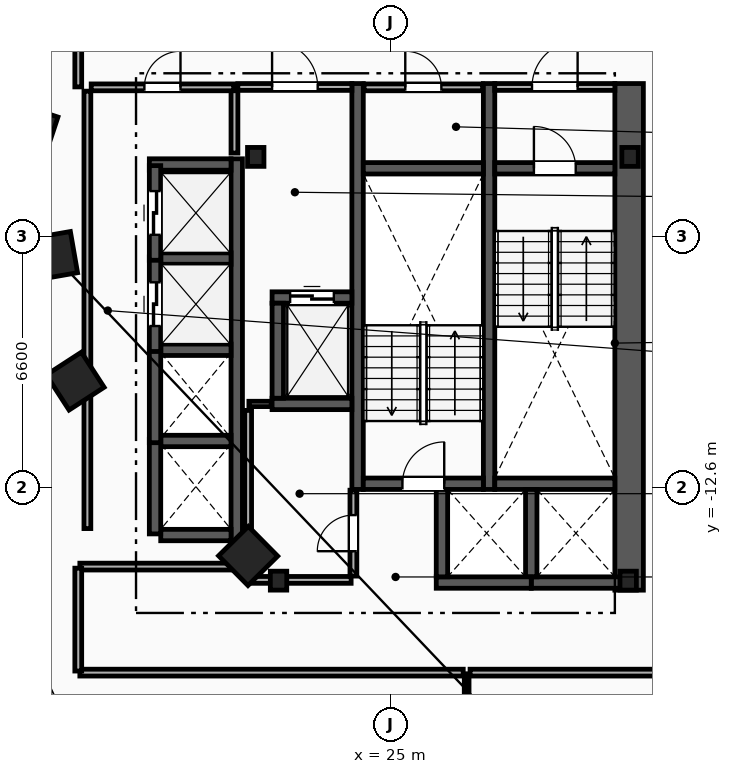
"""IFC4 building model, lengths in metres.
Left out: names, types, materials, properties, quantities, classifications, styles, units other than length and angle.
Written with IfcOpenShell. Run it as: python <this file> out.ifc"""

import sys

from ifc_helpers import new_model, si_unit, direction, frame, frame_2d, origin, origin_2d, place, context, subcontext, project, spatial, rectangle, i_section, extrude, element, fill, save


model = new_model("IFC4")
c1 = context("Model", 3, precision=1e-05, world=origin(), true_north=direction((0.0, 1.0)))
c2 = subcontext(c1, "Body", "Model", "MODEL_VIEW")
j1 = project(units=[si_unit("LENGTHUNIT", "METRE"), si_unit("PLANEANGLEUNIT", "RADIAN")], contexts=[c1])
p1 = place(None, origin())
s1 = spatial("IfcSite", under=j1, at=p1, CompositionType="ELEMENT")
p2 = place(p1, origin())
s2 = spatial("IfcBuilding", under=s1, at=p2, CompositionType="ELEMENT")
p3 = place(p2, frame((0.0, 0.0, 103.4)))
s3 = spatial("IfcBuildingStorey", under=s2, at=p3, CompositionType="ELEMENT", Elevation=103.4)
for number, where, z_axis, x_axis in (
    (1, (31.3, -3.9, 0.0), (0.0, 0.0, 1.0), (1.0, 0.0, 0.0)),
    (2, (21.45, -3.9, 0.0), (0.0, 0.0, 1.0), (1.0, 0.0, 0.0)),
    (3, (22.05, -15.05, 0.0), (0.0, 0.0, 1.0), (1.0, 0.0, 0.0)),
    (4, (31.25, -15.05, 0.0), (0.0, 0.0, 1.0), (1.0, 0.0, 0.0)),
):
    element("IfcColumn", number, at=place(p3, frame(where, z_axis=z_axis, x_axis=x_axis)), inside=s3, PredefinedType="COLUMN", context=c2, shape_type="SweptSolid", body=[
        extrude(i_section(OverallWidth=0.432, OverallDepth=0.498, WebThickness=0.056, FlangeThickness=0.089, FilletRadius=0.018, at=origin_2d()), origin(), (0.0, 0.0, 1.0), 3.6),
    ])
for number, where, z_axis, x_axis in (
    (5, (15.55, -3.2, 0.0), (0.0, 0.0, 1.0), (-0.315, -0.949, 0.0)),
    (6, (16.125, -6.5, 0.0), (0.0, 0.0, 1.0), (0.172, -0.985, 0.0)),
    (7, (16.7, -9.8, 0.0), (0.0, 0.0, 1.0), (0.544, -0.839, 0.0)),
    (8, (21.25, -14.4, 0.0), (0.0, 0.0, 1.0), (0.703, -0.711, 0.0)),
):
    element("IfcColumn", number, at=place(p3, frame(where, z_axis=z_axis, x_axis=x_axis)), inside=s3, PredefinedType="COLUMN", context=c2, shape_type="SweptSolid", body=[
        extrude(rectangle(XDim=1.1, YDim=1.1, at=origin_2d()), origin(), (0.0, 0.0, 1.0), 3.6),
    ])
p4 = place(p3, frame((31.275, -15.3, 0.0), z_axis=(0.0, 0.0, 1.0), x_axis=(0.0, 1.0, 0.0)))
e9 = element("IfcWall", 9, at=p4, inside=s3, PredefinedType="SHEAR", context=c2, shape_type="SweptSolid", body=[
    extrude(rectangle(XDim=13.33, YDim=0.75, at=frame_2d((6.665, 0.0))), origin(), (0.0, 0.0, 1.0), 3.3),
])
for number, where, z_axis, x_axis in (
    (10, (27.59, -12.65, 0.0), (0.0, 0.0, 1.0), (0.0, 1.0, 0.0)),
    (11, (24.13, -12.65, 0.0), (0.0, 0.0, 1.0), (0.0, 1.0, 0.0)),
):
    element("IfcWall", number, at=place(p3, frame(where, z_axis=z_axis, x_axis=x_axis)), inside=s3, PredefinedType="SHEAR", context=c2, shape_type="SweptSolid", body=[
        extrude(rectangle(XDim=10.68, YDim=0.3, at=frame_2d((5.34, 0.0))), origin(), (0.0, 0.0, 1.0), 3.3),
    ])
p5 = place(p3, frame((27.74, -4.2, 0.0), z_axis=(0.0, 0.0, 1.0), x_axis=(1.0, 0.0, 0.0)))
e12 = element("IfcWall", 12, at=p5, inside=s3, PredefinedType="SHEAR", context=c2, shape_type="SweptSolid", body=[
    extrude(rectangle(XDim=3.16, YDim=0.3, at=frame_2d((1.58, 0.0))), origin(), (0.0, 0.0, 1.0), 3.3),
])
p6 = place(p5, frame((1.03, 0.0, 0.0)))
e13 = element("IfcOpeningElement", 13, at=p6, cuts=e12, PredefinedType="OPENING", context=c2, shape_type="SweptSolid", body=[
    extrude(rectangle(XDim=1.1, YDim=2.15, at=frame_2d((0.55, 1.075))), frame((0.0, 0.16, 0.0), z_axis=(0.0, -1.0, 0.0), x_axis=(1.0, 0.0, 0.0)), (0.0, 0.0, 1.0), 0.32),
])
p7 = place(p3, frame((27.74, -12.5, 0.0), z_axis=(0.0, 0.0, 1.0), x_axis=(1.0, 0.0, 0.0)))
e14 = element("IfcWall", 14, at=p7, inside=s3, PredefinedType="SHEAR", context=c2, shape_type="SweptSolid", body=[
    extrude(rectangle(XDim=3.16, YDim=0.3, at=frame_2d((1.58, 0.0))), origin(), (0.0, 0.0, 1.0), 3.3),
])
p8 = place(p3, frame((24.28, -12.5, 0.0), z_axis=(0.0, 0.0, 1.0), x_axis=(1.0, 0.0, 0.0)))
e15 = element("IfcWall", 15, at=p8, inside=s3, PredefinedType="SHEAR", context=c2, shape_type="SweptSolid", body=[
    extrude(rectangle(XDim=3.16, YDim=0.3, at=frame_2d((1.58, 0.0))), origin(), (0.0, 0.0, 1.0), 3.3),
])
p9 = place(p8, frame((1.03, 0.0, 0.0)))
e16 = element("IfcOpeningElement", 16, at=p9, cuts=e15, PredefinedType="OPENING", context=c2, shape_type="SweptSolid", body=[
    extrude(rectangle(XDim=1.1, YDim=2.15, at=frame_2d((0.55, 1.075))), frame((0.0, 0.16, 0.0), z_axis=(0.0, -1.0, 0.0), x_axis=(1.0, 0.0, 0.0)), (0.0, 0.0, 1.0), 0.32),
])
p10 = place(p3, frame((24.28, -4.2, 0.0), z_axis=(0.0, 0.0, 1.0), x_axis=(1.0, 0.0, 0.0)))
e17 = element("IfcWall", 17, at=p10, inside=s3, PredefinedType="SHEAR", context=c2, shape_type="SweptSolid", body=[
    extrude(rectangle(XDim=3.16, YDim=0.3, at=frame_2d((1.58, 0.0))), origin(), (0.0, 0.0, 1.0), 3.3),
])
p11 = place(p3, frame((20.89, -3.8, 0.0), z_axis=(0.0, 0.0, 1.0), x_axis=(0.0, 1.0, 0.0)))
e18 = element("IfcWall", 18, at=p11, inside=s3, PredefinedType="PARTITIONING", context=c2, shape_type="SweptSolid", body=[
    extrude(rectangle(XDim=1.65, YDim=0.18, at=frame_2d((0.825, 0.0))), origin(), (0.0, 0.0, 1.0), 3.3),
])
p12 = place(p3, frame((20.98, -2.06, 0.0), z_axis=(0.0, 0.0, 1.0), x_axis=(1.0, 0.0, 0.0)))
e19 = element("IfcWall", 19, at=p12, inside=s3, PredefinedType="PARTITIONING", context=c2, shape_type="SweptSolid", body=[
    extrude(rectangle(XDim=3.0, YDim=0.18, at=frame_2d((1.5, 0.0))), origin(), (0.0, 0.0, 1.0), 3.3),
])
p13 = place(p12, frame((0.9, 0.0, 0.0)))
e20 = element("IfcOpeningElement", 20, at=p13, cuts=e19, PredefinedType="OPENING", context=c2, shape_type="SweptSolid", body=[
    extrude(rectangle(XDim=1.2, YDim=2.15, at=frame_2d((0.6, 1.075))), frame((0.0, 0.1, 0.0), z_axis=(0.0, -1.0, 0.0), x_axis=(1.0, 0.0, 0.0)), (0.0, 0.0, 1.0), 0.2),
])
p14 = place(p3, frame((27.74, -2.06, 0.0), z_axis=(0.0, 0.0, 1.0), x_axis=(1.0, 0.0, 0.0)))
e21 = element("IfcWall", 21, at=p14, inside=s3, PredefinedType="PARTITIONING", context=c2, shape_type="SweptSolid", body=[
    extrude(rectangle(XDim=3.16, YDim=0.18, at=frame_2d((1.58, 0.0))), origin(), (0.0, 0.0, 1.0), 3.3),
])
p15 = place(p14, frame((0.98, 0.0, 0.0)))
e22 = element("IfcOpeningElement", 22, at=p15, cuts=e21, PredefinedType="OPENING", context=c2, shape_type="SweptSolid", body=[
    extrude(rectangle(XDim=1.2, YDim=2.15, at=frame_2d((0.6, 1.075))), frame((0.0, 0.1, 0.0), z_axis=(0.0, -1.0, 0.0), x_axis=(1.0, 0.0, 0.0)), (0.0, 0.0, 1.0), 0.2),
])
p16 = place(p3, frame((21.88, -7.6, 0.0), z_axis=(0.0, 0.0, 1.0), x_axis=(1.0, 0.0, 0.0)))
e23 = element("IfcWall", 23, at=p16, inside=s3, PredefinedType="SHEAR", context=c2, shape_type="SweptSolid", body=[
    extrude(rectangle(XDim=2.1, YDim=0.3, at=frame_2d((1.05, 0.0))), origin(), (0.0, 0.0, 1.0), 3.3),
])
p17 = place(p16, frame((0.475, 0.0, 0.0)))
e24 = element("IfcOpeningElement", 24, at=p17, cuts=e23, PredefinedType="OPENING", context=c2, shape_type="SweptSolid", body=[
    extrude(rectangle(XDim=1.15, YDim=2.2, at=frame_2d((0.575, 1.1))), frame((0.0, 0.16, 0.0), z_axis=(0.0, -1.0, 0.0), x_axis=(1.0, 0.0, 0.0)), (0.0, 0.0, 1.0), 0.32),
])
p18 = place(p3, frame((21.88, -10.4, 0.0), z_axis=(0.0, 0.0, 1.0), x_axis=(1.0, 0.0, 0.0)))
e25 = element("IfcWall", 25, at=p18, inside=s3, PredefinedType="SHEAR", context=c2, shape_type="SweptSolid", body=[
    extrude(rectangle(XDim=2.1, YDim=0.3, at=frame_2d((1.05, 0.0))), origin(), (0.0, 0.0, 1.0), 3.3),
])
for number, where, z_axis, x_axis in (
    (26, (22.03, -10.25, 0.0), (0.0, 0.0, 1.0), (0.0, 1.0, 0.0)),
    (27, (28.7, -15.1, 0.0), (0.0, 0.0, 1.0), (1.0, 0.0, 0.0)),
):
    element("IfcWall", number, at=place(p3, frame(where, z_axis=z_axis, x_axis=x_axis)), inside=s3, PredefinedType="SHEAR", context=c2, shape_type="SweptSolid", body=[
        extrude(rectangle(XDim=2.5, YDim=0.3, at=frame_2d((1.25, 0.0))), origin(), (0.0, 0.0, 1.0), 3.3),
    ])
p19 = place(p3, frame((28.7, -14.95, 0.0), z_axis=(0.0, 0.0, 1.0), x_axis=(0.0, 1.0, 0.0)))
e28 = element("IfcWall", 28, at=p19, inside=s3, PredefinedType="SHEAR", context=c2, shape_type="SweptSolid", body=[
    extrude(rectangle(XDim=2.3, YDim=0.3, at=frame_2d((1.15, 0.0))), origin(), (0.0, 0.0, 1.0), 3.3),
])
p20 = place(p3, frame((26.2, -15.1, 0.0), z_axis=(0.0, 0.0, 1.0), x_axis=(1.0, 0.0, 0.0)))
e29 = element("IfcWall", 29, at=p20, inside=s3, PredefinedType="SHEAR", context=c2, shape_type="SweptSolid", body=[
    extrude(rectangle(XDim=2.5, YDim=0.3, at=frame_2d((1.25, 0.0))), origin(), (0.0, 0.0, 1.0), 3.3),
])
p21 = place(p3, frame((26.35, -14.95, 0.0), z_axis=(0.0, 0.0, 1.0), x_axis=(0.0, 1.0, 0.0)))
e30 = element("IfcWall", 30, at=p21, inside=s3, PredefinedType="SHEAR", context=c2, shape_type="SweptSolid", body=[
    extrude(rectangle(XDim=2.3, YDim=0.3, at=frame_2d((1.15, 0.0))), origin(), (0.0, 0.0, 1.0), 3.3),
])
p22 = place(p3, frame((20.95, -14.0, 0.0), z_axis=(0.0, 0.0, 1.0), x_axis=(0.0, 1.0, 0.0)))
e31 = element("IfcWall", 31, at=p22, inside=s3, PredefinedType="SHEAR", context=c2, shape_type="SweptSolid", body=[
    extrude(rectangle(XDim=10.05, YDim=0.3, at=frame_2d((5.025, 0.0))), origin(), (0.0, 0.0, 1.0), 3.3),
])
p23 = place(p3, frame((18.95, -13.85, 0.0), z_axis=(0.0, 0.0, 1.0), x_axis=(1.0, 0.0, 0.0)))
e32 = element("IfcWall", 32, at=p23, inside=s3, PredefinedType="SHEAR", context=c2, shape_type="SweptSolid", body=[
    extrude(rectangle(XDim=1.85, YDim=0.3, at=frame_2d((0.925, 0.0))), origin(), (0.0, 0.0, 1.0), 3.3),
])
p24 = place(p3, frame((18.65, -4.1, 0.0), z_axis=(0.0, 0.0, 1.0), x_axis=(1.0, 0.0, 0.0)))
e33 = element("IfcWall", 33, at=p24, inside=s3, PredefinedType="SHEAR", context=c2, shape_type="SweptSolid", body=[
    extrude(rectangle(XDim=2.15, YDim=0.3, at=frame_2d((1.075, 0.0))), origin(), (0.0, 0.0, 1.0), 3.3),
])
for number, where, z_axis, x_axis in (
    (34, (18.95, -11.375, 0.0), (0.0, 0.0, 1.0), (1.0, 0.0, 0.0)),
    (35, (18.95, -8.975, 0.0), (0.0, 0.0, 1.0), (1.0, 0.0, 0.0)),
    (36, (18.95, -6.575, 0.0), (0.0, 0.0, 1.0), (1.0, 0.0, 0.0)),
):
    element("IfcWall", number, at=place(p3, frame(where, z_axis=z_axis, x_axis=x_axis)), inside=s3, PredefinedType="SHEAR", context=c2, shape_type="SweptSolid", body=[
        extrude(rectangle(XDim=1.85, YDim=0.3, at=frame_2d((0.925, 0.0))), origin(), (0.0, 0.0, 1.0), 3.3),
    ])
for number, where, z_axis, x_axis in (
    (37, (18.8, -13.82, 0.0), (0.0, 0.0, 1.0), (0.0, 1.0, 0.0)),
    (38, (18.8, -11.42, 0.0), (0.0, 0.0, 1.0), (0.0, 1.0, 0.0)),
):
    element("IfcWall", number, at=place(p3, frame(where, z_axis=z_axis, x_axis=x_axis)), inside=s3, PredefinedType="SHEAR", context=c2, shape_type="SweptSolid", body=[
        extrude(rectangle(XDim=2.49, YDim=0.3, at=frame_2d((1.245, 0.0))), origin(), (0.0, 0.0, 1.0), 3.3),
    ])
p25 = place(p3, frame((18.8, -9.02, 0.0), z_axis=(0.0, 0.0, 1.0), x_axis=(0.0, 1.0, 0.0)))
e39 = element("IfcWall", 39, at=p25, inside=s3, PredefinedType="SHEAR", context=c2, shape_type="SweptSolid", body=[
    extrude(rectangle(XDim=2.49, YDim=0.3, at=frame_2d((1.245, 0.0))), origin(), (0.0, 0.0, 1.0), 3.3),
])
p26 = place(p25, frame((0.67, 0.0, 0.0)))
e40 = element("IfcOpeningElement", 40, at=p26, cuts=e39, PredefinedType="OPENING", context=c2, shape_type="SweptSolid", body=[
    extrude(rectangle(XDim=1.15, YDim=2.2, at=frame_2d((0.575, 1.1))), frame((0.0, 0.16, 0.0), z_axis=(0.0, -1.0, 0.0), x_axis=(1.0, 0.0, 0.0)), (0.0, 0.0, 1.0), 0.32),
])
p27 = place(p3, frame((18.8, -6.62, 0.0), z_axis=(0.0, 0.0, 1.0), x_axis=(0.0, 1.0, 0.0)))
e41 = element("IfcWall", 41, at=p27, inside=s3, PredefinedType="SHEAR", context=c2, shape_type="SweptSolid", body=[
    extrude(rectangle(XDim=2.49, YDim=0.3, at=frame_2d((1.245, 0.0))), origin(), (0.0, 0.0, 1.0), 3.3),
])
p28 = place(p27, frame((0.67, 0.0, 0.0)))
e42 = element("IfcOpeningElement", 42, at=p28, cuts=e41, PredefinedType="OPENING", context=c2, shape_type="SweptSolid", body=[
    extrude(rectangle(XDim=1.15, YDim=2.2, at=frame_2d((0.575, 1.1))), frame((0.0, 0.16, 0.0), z_axis=(0.0, -1.0, 0.0), x_axis=(1.0, 0.0, 0.0)), (0.0, 0.0, 1.0), 0.32),
])
p29 = place(p3, frame((17.02, -13.68, 0.0), z_axis=(0.0, 0.0, 1.0), x_axis=(0.0, 1.0, 0.0)))
e43 = element("IfcWall", 43, at=p29, inside=s3, PredefinedType="PARTITIONING", context=c2, shape_type="SweptSolid", body=[
    extrude(rectangle(XDim=11.51, YDim=0.18, at=frame_2d((5.755, 0.0))), origin(), (0.0, 0.0, 1.0), 3.3),
])
p30 = place(p3, frame((17.12, -2.07, 0.0), z_axis=(0.0, 0.0, 1.0), x_axis=(1.0, 0.0, 0.0)))
e44 = element("IfcWall", 44, at=p30, inside=s3, PredefinedType="PARTITIONING", context=c2, shape_type="SweptSolid", body=[
    extrude(rectangle(XDim=3.75, YDim=0.18, at=frame_2d((1.875, 0.0))), origin(), (0.0, 0.0, 1.0), 3.3),
])
p31 = place(p30, frame((1.4, 0.0, 0.0)))
e45 = element("IfcOpeningElement", 45, at=p31, cuts=e44, PredefinedType="OPENING", context=c2, shape_type="SweptSolid", body=[
    extrude(rectangle(XDim=0.95, YDim=2.1, at=frame_2d((0.475, 1.05))), frame((0.0, 0.1, 0.0), z_axis=(0.0, -1.0, 0.0), x_axis=(1.0, 0.0, 0.0)), (0.0, 0.0, 1.0), 0.2),
])
p32 = place(p3, frame((21.27, -10.4, 0.0), z_axis=(0.0, 0.0, 1.0), x_axis=(1.0, 0.0, 0.0)))
e46 = element("IfcWall", 46, at=p32, inside=s3, PredefinedType="PARTITIONING", context=c2, shape_type="SweptSolid", body=[
    extrude(rectangle(XDim=0.59, YDim=0.14, at=frame_2d((0.295, 0.0))), origin(), (0.0, 0.0, 1.0), 3.3),
])
p33 = place(p3, frame((21.25, -14.93, 0.0), z_axis=(0.0, 0.0, 1.0), x_axis=(0.0, 1.0, 0.0)))
e47 = element("IfcWall", 47, at=p33, inside=s3, PredefinedType="PARTITIONING", context=c2, shape_type="SweptSolid", body=[
    extrude(rectangle(XDim=4.36, YDim=0.18, at=frame_2d((2.18, 0.0))), origin(), (0.0, 0.0, 1.0), 3.3),
])
p34 = place(p3, frame((21.35, -15.03, 0.0), z_axis=(0.0, 0.0, 1.0), x_axis=(1.0, 0.0, 0.0)))
e48 = element("IfcWall", 48, at=p34, inside=s3, PredefinedType="PARTITIONING", context=c2, shape_type="SweptSolid", body=[
    extrude(rectangle(XDim=2.61, YDim=0.18, at=frame_2d((1.305, 0.0))), origin(), (0.0, 0.0, 1.0), 2.373),
])
p35 = place(p3, frame((24.3, -2.07, 0.0), z_axis=(0.0, 0.0, 1.0), x_axis=(1.0, 0.0, 0.0)))
e49 = element("IfcWall", 49, at=p35, inside=s3, PredefinedType="PARTITIONING", context=c2, shape_type="SweptSolid", body=[
    extrude(rectangle(XDim=3.12, YDim=0.18, at=frame_2d((1.56, 0.0))), origin(), (0.0, 0.0, 1.0), 3.3),
])
p36 = place(p35, frame((1.085, 0.0, 0.0)))
e50 = element("IfcOpeningElement", 50, at=p36, cuts=e49, PredefinedType="OPENING", context=c2, shape_type="SweptSolid", body=[
    extrude(rectangle(XDim=0.95, YDim=2.1, at=frame_2d((0.475, 1.05))), frame((0.0, 0.1, 0.0), z_axis=(0.0, -1.0, 0.0), x_axis=(1.0, 0.0, 0.0)), (0.0, 0.0, 1.0), 0.2),
])
p37 = place(p3, frame((24.02, -14.93, 0.0), z_axis=(0.0, 0.0, 1.0), x_axis=(0.0, 1.0, 0.0)))
e51 = element("IfcWall", 51, at=p37, inside=s3, PredefinedType="PARTITIONING", context=c2, shape_type="SweptSolid", body=[
    extrude(rectangle(XDim=2.26, YDim=0.18, at=frame_2d((1.13, 0.0))), origin(), (0.0, 0.0, 1.0), 3.3),
])
p38 = place(p37, frame((0.655, 0.0, 0.0)))
e52 = element("IfcOpeningElement", 52, at=p38, cuts=e51, PredefinedType="OPENING", context=c2, shape_type="SweptSolid", body=[
    extrude(rectangle(XDim=0.95, YDim=2.1, at=frame_2d((0.475, 1.05))), frame((0.0, 0.1, 0.0), z_axis=(0.0, -1.0, 0.0), x_axis=(1.0, 0.0, 0.0)), (0.0, 0.0, 1.0), 0.2),
])
p39 = place(p3, frame((27.0, -25.404, 0.0), z_axis=(0.0, 0.0, 1.0), x_axis=(0.0, 1.0, 0.0)))
e53 = element("IfcWall", 53, at=p39, inside=s3, PredefinedType="PARTITIONING", context=c2, shape_type="SweptSolid", body=[
    extrude(rectangle(XDim=7.904, YDim=0.125, at=frame_2d((3.952, 0.0))), origin(), (0.0, 0.0, 1.0), 3.3),
])
p40 = place(p3, frame((27.09, -17.47, 0.0), z_axis=(0.0, 0.0, 1.0), x_axis=(1.0, 0.0, 0.0)))
e54 = element("IfcWall", 54, at=p40, inside=s3, PredefinedType="PARTITIONING", context=c2, shape_type="SweptSolid", body=[
    extrude(rectangle(XDim=6.538, YDim=0.18, at=frame_2d((3.269, 0.0))), origin(), (0.0, 0.0, 1.0), 3.3),
])
p41 = place(p3, frame((16.822, -17.47, 0.0), z_axis=(0.0, 0.0, 1.0), x_axis=(1.0, 0.0, 0.0)))
e55 = element("IfcWall", 55, at=p41, inside=s3, PredefinedType="PARTITIONING", context=c2, shape_type="SweptSolid", body=[
    extrude(rectangle(XDim=10.088, YDim=0.18, at=frame_2d((5.044, 0.0))), origin(), (0.0, 0.0, 1.0), 3.3),
])
p42 = place(p3, frame((21.178, -14.68, 0.0), z_axis=(0.0, 0.0, 1.0), x_axis=(-1.0, 0.0, 0.0)))
e56 = element("IfcWall", 56, at=p42, inside=s3, PredefinedType="PARTITIONING", context=c2, shape_type="SweptSolid", body=[
    extrude(rectangle(XDim=4.357, YDim=0.18, at=frame_2d((2.178, 0.0))), origin(), (0.0, 0.0, 1.0), 3.3),
])
p43 = place(p3, frame((16.78, -14.721, 0.0), z_axis=(0.0, 0.0, 1.0), x_axis=(0.0, -1.0, 0.0)))
e57 = element("IfcWall", 57, at=p43, inside=s3, PredefinedType="PARTITIONING", context=c2, shape_type="SweptSolid", body=[
    extrude(rectangle(XDim=2.707, YDim=0.18, at=frame_2d((1.354, 0.0))), origin(), (0.0, 0.0, 1.0), 3.3),
])
p44 = place(p3, frame((16.78, 0.329, 0.0), z_axis=(0.0, 0.0, 1.0), x_axis=(0.0, -1.0, 0.0)))
e58 = element("IfcWall", 58, at=p44, inside=s3, PredefinedType="PARTITIONING", context=c2, shape_type="SweptSolid", body=[
    extrude(rectangle(XDim=2.387, YDim=0.18, at=frame_2d((1.194, 0.0))), origin(), (0.0, 0.0, 1.0), 3.3),
])
p45 = place(p6, origin())
e59 = element("IfcDoor", 59, at=p45, inside=s3, OperationType="SINGLE_SWING_LEFT", PredefinedType="DOOR", context=c2, shape_type="SweptSolid", body=[
    extrude(rectangle(XDim=1.1, YDim=2.15, at=frame_2d((0.55, 1.075))), frame((0.0, 0.025, 0.0), z_axis=(0.0, -1.0, 0.0), x_axis=(1.0, 0.0, 0.0)), (0.0, 0.0, 1.0), 0.05),
])
fill(e13, e59)
p46 = place(p9, origin())
e60 = element("IfcDoor", 60, at=p46, inside=s3, OperationType="SINGLE_SWING_RIGHT", PredefinedType="DOOR", context=c2, shape_type="SweptSolid", body=[
    extrude(rectangle(XDim=1.1, YDim=2.15, at=frame_2d((0.55, 1.075))), frame((0.0, 0.025, 0.0), z_axis=(0.0, -1.0, 0.0), x_axis=(1.0, 0.0, 0.0)), (0.0, 0.0, 1.0), 0.05),
])
fill(e16, e60)
p47 = place(p13, origin())
e61 = element("IfcDoor", 61, at=p47, inside=s3, OperationType="SINGLE_SWING_LEFT", PredefinedType="DOOR", context=c2, shape_type="SweptSolid", body=[
    extrude(rectangle(XDim=1.2, YDim=2.15, at=frame_2d((0.6, 1.075))), frame((0.0, 0.025, 0.0), z_axis=(0.0, -1.0, 0.0), x_axis=(1.0, 0.0, 0.0)), (0.0, 0.0, 1.0), 0.05),
])
fill(e20, e61)
p48 = place(p15, origin())
e62 = element("IfcDoor", 62, at=p48, inside=s3, OperationType="SINGLE_SWING_RIGHT", PredefinedType="DOOR", context=c2, shape_type="SweptSolid", body=[
    extrude(rectangle(XDim=1.2, YDim=2.15, at=frame_2d((0.6, 1.075))), frame((0.0, 0.025, 0.0), z_axis=(0.0, -1.0, 0.0), x_axis=(1.0, 0.0, 0.0)), (0.0, 0.0, 1.0), 0.05),
])
fill(e22, e62)
p49 = place(p17, origin())
e63 = element("IfcDoor", 63, at=p49, inside=s3, OperationType="SLIDING_TO_LEFT", PredefinedType="TRAPDOOR", context=c2, shape_type="SweptSolid", body=[
    extrude(rectangle(XDim=1.15, YDim=2.2, at=frame_2d((0.575, 1.1))), frame((0.0, 0.025, 0.0), z_axis=(0.0, -1.0, 0.0), x_axis=(1.0, 0.0, 0.0)), (0.0, 0.0, 1.0), 0.05),
])
fill(e24, e63)
p50 = place(p26, origin())
e64 = element("IfcDoor", 64, at=p50, inside=s3, OperationType="SLIDING_TO_LEFT", PredefinedType="TRAPDOOR", context=c2, shape_type="SweptSolid", body=[
    extrude(rectangle(XDim=1.15, YDim=2.2, at=frame_2d((0.575, 1.1))), frame((0.0, 0.025, 0.0), z_axis=(0.0, -1.0, 0.0), x_axis=(1.0, 0.0, 0.0)), (0.0, 0.0, 1.0), 0.05),
])
fill(e40, e64)
p51 = place(p28, origin())
e65 = element("IfcDoor", 65, at=p51, inside=s3, OperationType="SLIDING_TO_LEFT", PredefinedType="TRAPDOOR", context=c2, shape_type="SweptSolid", body=[
    extrude(rectangle(XDim=1.15, YDim=2.2, at=frame_2d((0.575, 1.1))), frame((0.0, 0.025, 0.0), z_axis=(0.0, -1.0, 0.0), x_axis=(1.0, 0.0, 0.0)), (0.0, 0.0, 1.0), 0.05),
])
fill(e42, e65)
p52 = place(p31, origin())
e66 = element("IfcDoor", 66, at=p52, inside=s3, OperationType="SINGLE_SWING_RIGHT", PredefinedType="DOOR", context=c2, shape_type="SweptSolid", body=[
    extrude(rectangle(XDim=0.95, YDim=2.1, at=frame_2d((0.475, 1.05))), frame((0.0, 0.025, 0.0), z_axis=(0.0, -1.0, 0.0), x_axis=(1.0, 0.0, 0.0)), (0.0, 0.0, 1.0), 0.05),
])
fill(e45, e66)
p53 = place(p36, origin())
e67 = element("IfcDoor", 67, at=p53, inside=s3, OperationType="SINGLE_SWING_LEFT", PredefinedType="DOOR", context=c2, shape_type="SweptSolid", body=[
    extrude(rectangle(XDim=0.95, YDim=2.1, at=frame_2d((0.475, 1.05))), frame((0.0, 0.025, 0.0), z_axis=(0.0, -1.0, 0.0), x_axis=(1.0, 0.0, 0.0)), (0.0, 0.0, 1.0), 0.05),
])
fill(e50, e67)
p54 = place(p38, origin())
e68 = element("IfcDoor", 68, at=p54, inside=s3, OperationType="SINGLE_SWING_LEFT", PredefinedType="DOOR", context=c2, shape_type="SweptSolid", body=[
    extrude(rectangle(XDim=0.95, YDim=2.1, at=frame_2d((0.475, 1.05))), frame((0.0, 0.025, 0.0), z_axis=(0.0, -1.0, 0.0), x_axis=(1.0, 0.0, 0.0)), (0.0, 0.0, 1.0), 0.05),
])
fill(e52, e68)
save(model, sys.argv[1])
